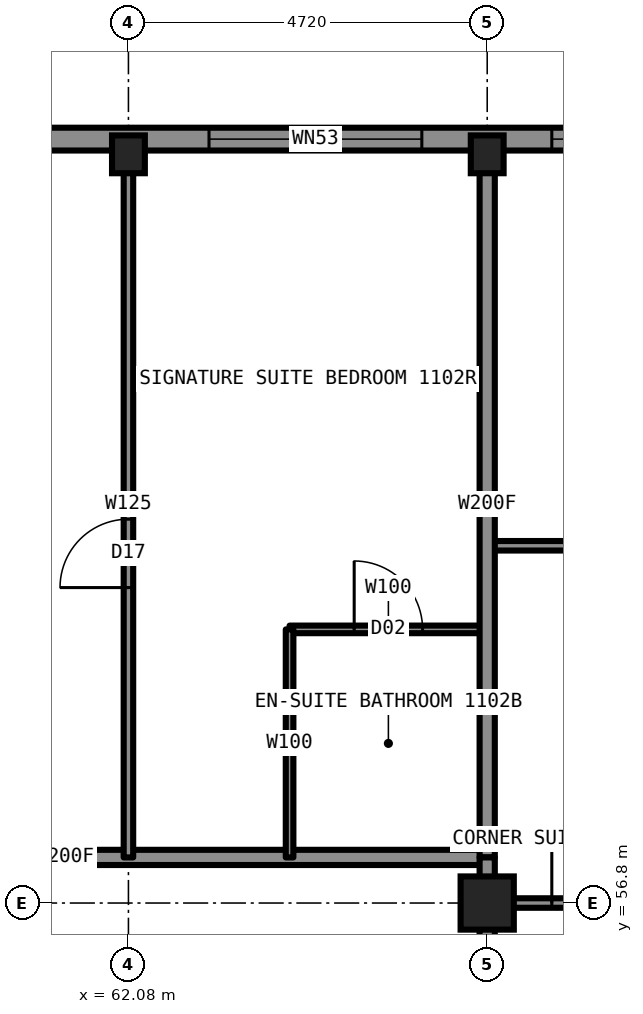
"""IFC4 building model, lengths in metres.
Left out: names, types, materials, properties, quantities, classifications, styles, units other than length and angle.
Written with IfcOpenShell. Run it as: python <this file> out.ifc"""

import sys

from ifc_helpers import new_model, si_unit, direction, frame, frame_2d, origin, origin_2d, place, context, subcontext, project, spatial, rectangle, hollow_rectangle, i_section, extrude, element, fill, save


model = new_model("IFC4")
c1 = context("Model", 3, precision=1e-05, world=origin(), true_north=direction((0.0, 1.0)))
c2 = subcontext(c1, "Body", "Model", "MODEL_VIEW")
j1 = project(units=[si_unit("LENGTHUNIT", "METRE"), si_unit("PLANEANGLEUNIT", "RADIAN")], contexts=[c1])
p1 = place(None, origin())
s1 = spatial("IfcSite", under=j1, at=p1, CompositionType="ELEMENT")
p2 = place(p1, origin())
s2 = spatial("IfcBuilding", under=s1, at=p2, CompositionType="ELEMENT")
p3 = place(p2, frame((0.0, 0.0, 39.0)))
s3 = spatial("IfcBuildingStorey", under=s2, at=p3, CompositionType="ELEMENT", Elevation=39.0)
for number, where, z_axis, x_axis in (
    (1, (62.08, 66.65, 0.0), (0.0, 0.0, 1.0), (1.0, 0.0, 0.0)),
    (2, (66.8, 66.65, 0.0), (0.0, 0.0, 1.0), (1.0, 0.0, 0.0)),
):
    element("IfcColumn", number, at=place(p3, frame(where, z_axis=z_axis, x_axis=x_axis)), inside=s3, PredefinedType="COLUMN", context=c2, shape_type="SweptSolid", body=[
        extrude(i_section(OverallWidth=0.432, OverallDepth=0.498, WebThickness=0.056, FlangeThickness=0.089, at=origin_2d()), origin(), (0.0, 0.0, 1.0), 3.5),
    ])
p4 = place(p3, frame((66.8, 56.8, 0.0), z_axis=(0.0, 0.0, 1.0), x_axis=(1.0, 0.0, 0.0)))
e3 = element("IfcColumn", 3, at=p4, inside=s3, PredefinedType="COLUMN", context=c2, shape_type="SweptSolid", body=[
    extrude(hollow_rectangle(XDim=0.7, YDim=0.7, WallThickness=0.06, at=origin_2d()), origin(), (0.0, 0.0, 1.0), 3.5),
])
p5 = place(p3, frame((66.8, 56.8, 0.0), z_axis=(0.0, 0.0, 1.0), x_axis=(1.0, 0.0, 0.0)))
e4 = element("IfcWall", 4, at=p5, inside=s3, PredefinedType="PARTITIONING", context=c2, shape_type="SweptSolid", body=[
    extrude(rectangle(XDim=9.9, YDim=0.125, at=frame_2d((4.95, 0.0))), origin(), (0.0, 0.0, 1.0), 2.573),
])
p6 = place(p5, frame((0.85, 0.0, 0.0)))
e5 = element("IfcOpeningElement", 5, at=p6, cuts=e4, PredefinedType="OPENING", context=c2, shape_type="SweptSolid", body=[
    extrude(rectangle(XDim=0.9, YDim=2.2, at=frame_2d((0.45, 1.1))), frame((0.0, 0.073, 0.0), z_axis=(0.0, -1.0, 0.0), x_axis=(1.0, 0.0, 0.0)), (0.0, 0.0, 1.0), 0.145),
])
p7 = place(p3, frame((43.2, 57.4, 0.0), z_axis=(0.0, 0.0, 1.0), x_axis=(1.0, 0.0, 0.0)))
e6 = element("IfcWall", 6, at=p7, inside=s3, PredefinedType="PARTITIONING", context=c2, shape_type="SweptSolid", body=[
    extrude(rectangle(XDim=23.6, YDim=0.2, at=frame_2d((11.8, 0.0))), origin(), (0.0, 0.0, 1.0), 3.33),
])
p8 = place(p7, frame((3.0, 0.0, 0.0)))
e7 = element("IfcOpeningElement", 7, at=p8, cuts=e6, PredefinedType="OPENING", context=c2, shape_type="SweptSolid", body=[
    extrude(rectangle(XDim=1.0, YDim=2.2, at=frame_2d((0.5, 1.1))), frame((0.0, 0.11, 0.0), z_axis=(0.0, -1.0, 0.0), x_axis=(1.0, 0.0, 0.0)), (0.0, 0.0, 1.0), 0.22),
])
p9 = place(p7, frame((11.29, 0.0, 0.0)))
e8 = element("IfcOpeningElement", 8, at=p9, cuts=e6, PredefinedType="OPENING", context=c2, shape_type="SweptSolid", body=[
    extrude(rectangle(XDim=1.1, YDim=2.2, at=frame_2d((0.55, 1.1))), frame((0.0, 0.11, 0.0), z_axis=(0.0, -1.0, 0.0), x_axis=(1.0, 0.0, 0.0)), (0.0, 0.0, 1.0), 0.22),
])
p10 = place(p3, frame((64.2, 60.4, 0.0), z_axis=(0.0, 0.0, 1.0), x_axis=(1.0, 0.0, 0.0)))
e9 = element("IfcWall", 9, at=p10, inside=s3, PredefinedType="PARTITIONING", context=c2, shape_type="SweptSolid", body=[
    extrude(rectangle(XDim=2.6, YDim=0.1, at=frame_2d((1.3, 0.0))), origin(), (0.0, 0.0, 1.0), 3.33),
])
p11 = place(p10, frame((0.85, 0.0, 0.0)))
e10 = element("IfcOpeningElement", 10, at=p11, cuts=e9, PredefinedType="OPENING", context=c2, shape_type="SweptSolid", body=[
    extrude(rectangle(XDim=0.9, YDim=2.1, at=frame_2d((0.45, 1.05))), frame((0.0, 0.06, 0.0), z_axis=(0.0, -1.0, 0.0), x_axis=(1.0, 0.0, 0.0)), (0.0, 0.0, 1.0), 0.12),
])
p12 = place(p3, frame((66.8, 61.5, 0.0), z_axis=(0.0, 0.0, 1.0), x_axis=(1.0, 0.0, 0.0)))
e11 = element("IfcWall", 11, at=p12, inside=s3, PredefinedType="PARTITIONING", context=c2, shape_type="SweptSolid", body=[
    extrude(rectangle(XDim=9.894, YDim=0.125, at=frame_2d((4.947, 0.0))), origin(), (0.0, 0.0, 1.0), 3.33),
])
p13 = place(p12, frame((1.75, 0.0, 0.0)))
e12 = element("IfcOpeningElement", 12, at=p13, cuts=e11, PredefinedType="OPENING", context=c2, shape_type="SweptSolid", body=[
    extrude(rectangle(XDim=0.9, YDim=2.2, at=frame_2d((0.45, 1.1))), frame((0.0, 0.073, 0.0), z_axis=(0.0, -1.0, 0.0), x_axis=(1.0, 0.0, 0.0)), (0.0, 0.0, 1.0), 0.145),
])
p14 = place(p3, frame((66.8, 33.2, 0.0), z_axis=(0.0, 0.0, 1.0), x_axis=(0.0, 1.0, 0.0)))
e13 = element("IfcWall", 13, at=p14, inside=s3, PredefinedType="PARTITIONING", context=c2, shape_type="SweptSolid", body=[
    extrude(rectangle(XDim=23.58, YDim=0.2, at=frame_2d((11.79, 0.0))), origin(), (0.0, 0.0, 1.0), 3.33),
])
p15 = place(p14, frame((7.72, 0.0, 0.0)))
e14 = element("IfcOpeningElement", 14, at=p15, cuts=e13, PredefinedType="OPENING", context=c2, shape_type="SweptSolid", body=[
    extrude(rectangle(XDim=1.0, YDim=2.2, at=frame_2d((0.5, 1.1))), frame((0.0, 0.11, 0.0), z_axis=(0.0, -1.0, 0.0), x_axis=(1.0, 0.0, 0.0)), (0.0, 0.0, 1.0), 0.22),
])
p16 = place(p14, frame((17.31, 0.0, 0.0)))
e15 = element("IfcOpeningElement", 15, at=p16, cuts=e13, PredefinedType="OPENING", context=c2, shape_type="SweptSolid", body=[
    extrude(rectangle(XDim=1.0, YDim=2.2, at=frame_2d((0.5, 1.1))), frame((0.0, 0.11, 0.0), z_axis=(0.0, -1.0, 0.0), x_axis=(1.0, 0.0, 0.0)), (0.0, 0.0, 1.0), 0.22),
])
p17 = place(p14, frame((21.84, 0.0, 0.0)))
e16 = element("IfcOpeningElement", 16, at=p17, cuts=e13, PredefinedType="OPENING", context=c2, shape_type="SweptSolid", body=[
    extrude(rectangle(XDim=1.1, YDim=2.2, at=frame_2d((0.55, 1.1))), frame((0.0, 0.11, 0.0), z_axis=(0.0, -1.0, 0.0), x_axis=(1.0, 0.0, 0.0)), (0.0, 0.0, 1.0), 0.22),
])
p18 = place(p14, frame((0.66, 0.0, 0.0)))
e17 = element("IfcOpeningElement", 17, at=p18, cuts=e13, PredefinedType="OPENING", context=c2, shape_type="SweptSolid", body=[
    extrude(rectangle(XDim=1.1, YDim=2.2, at=frame_2d((0.55, 1.1))), frame((0.0, 0.11, 0.0), z_axis=(0.0, -1.0, 0.0), x_axis=(1.0, 0.0, 0.0)), (0.0, 0.0, 1.0), 0.22),
])
p19 = place(p3, frame((66.8, 57.4, 0.0), z_axis=(0.0, 0.0, 1.0), x_axis=(0.0, 1.0, 0.0)))
e18 = element("IfcWall", 18, at=p19, inside=s3, PredefinedType="PARTITIONING", context=c2, shape_type="SweptSolid", body=[
    extrude(rectangle(XDim=9.3, YDim=0.2, at=frame_2d((4.65, 0.0))), origin(), (0.0, 0.0, 1.0), 2.573),
])
p20 = place(p3, frame((62.08, 57.4, 0.0), z_axis=(0.0, 0.0, 1.0), x_axis=(0.0, 1.0, 0.0)))
e19 = element("IfcWall", 19, at=p20, inside=s3, PredefinedType="PARTITIONING", context=c2, shape_type="SweptSolid", body=[
    extrude(rectangle(XDim=9.3, YDim=0.125, at=frame_2d((4.65, 0.0))), origin(), (0.0, 0.0, 1.0), 2.573),
])
p21 = place(p20, frame((3.55, 0.0, 0.0)))
e20 = element("IfcOpeningElement", 20, at=p21, cuts=e19, PredefinedType="OPENING", context=c2, shape_type="SweptSolid", body=[
    extrude(rectangle(XDim=0.9, YDim=2.2, at=frame_2d((0.45, 1.1))), frame((0.0, 0.073, 0.0), z_axis=(0.0, -1.0, 0.0), x_axis=(1.0, 0.0, 0.0)), (0.0, 0.0, 1.0), 0.145),
])
p22 = place(p3, frame((64.2, 57.4, 0.0), z_axis=(0.0, 0.0, 1.0), x_axis=(0.0, 1.0, 0.0)))
e21 = element("IfcWall", 21, at=p22, inside=s3, PredefinedType="PARTITIONING", context=c2, shape_type="SweptSolid", body=[
    extrude(rectangle(XDim=3.0, YDim=0.1, at=frame_2d((1.5, 0.0))), origin(), (0.0, 0.0, 1.0), 3.33),
])
p23 = place(p3, frame((71.5, 66.85, 0.0), z_axis=(0.0, 0.0, 1.0), x_axis=(-1.0, 0.0, 0.0)))
e22 = element("IfcWall", 22, at=p23, inside=s3, PredefinedType="SOLIDWALL", context=c2, shape_type="SweptSolid", body=[
    extrude(rectangle(XDim=33.0, YDim=0.3, at=frame_2d((16.5, 0.0))), origin(), (0.0, 0.0, 1.0), 2.83),
])
p24 = place(p23, frame((0.85, 0.0, 0.5)))
e23 = element("IfcOpeningElement", 23, at=p24, cuts=e22, PredefinedType="OPENING", context=c2, shape_type="SweptSolid", body=[
    extrude(rectangle(XDim=2.5, YDim=2.0, at=frame_2d((1.25, 1.0))), frame((0.0, 0.16, 0.0), z_axis=(0.0, -1.0, 0.0), x_axis=(1.0, 0.0, 0.0)), (0.0, 0.0, 1.0), 0.32),
])
p25 = place(p23, frame((6.61, 0.0, 0.5)))
e24 = element("IfcOpeningElement", 24, at=p25, cuts=e22, PredefinedType="OPENING", context=c2, shape_type="SweptSolid", body=[
    extrude(rectangle(XDim=1.9, YDim=1.9, at=frame_2d((0.95, 0.95))), frame((0.0, 0.16, 0.0), z_axis=(0.0, -1.0, 0.0), x_axis=(1.0, 0.0, 0.0)), (0.0, 0.0, 1.0), 0.32),
])
p26 = place(p23, frame((10.28, 0.0, 0.5)))
e25 = element("IfcOpeningElement", 25, at=p26, cuts=e22, PredefinedType="OPENING", context=c2, shape_type="SweptSolid", body=[
    extrude(rectangle(XDim=3.0, YDim=2.0, at=frame_2d((1.5, 1.0))), frame((0.0, 0.16, 0.0), z_axis=(0.0, -1.0, 0.0), x_axis=(1.0, 0.0, 0.0)), (0.0, 0.0, 1.0), 0.32),
])
p27 = place(p23, frame((15.0, 0.0, 0.5)))
e26 = element("IfcOpeningElement", 26, at=p27, cuts=e22, PredefinedType="OPENING", context=c2, shape_type="SweptSolid", body=[
    extrude(rectangle(XDim=3.0, YDim=2.0, at=frame_2d((1.5, 1.0))), frame((0.0, 0.16, 0.0), z_axis=(0.0, -1.0, 0.0), x_axis=(1.0, 0.0, 0.0)), (0.0, 0.0, 1.0), 0.32),
])
p28 = place(p23, frame((19.72, 0.0, 0.5)))
e27 = element("IfcOpeningElement", 27, at=p28, cuts=e22, PredefinedType="OPENING", context=c2, shape_type="SweptSolid", body=[
    extrude(rectangle(XDim=3.0, YDim=2.0, at=frame_2d((1.5, 1.0))), frame((0.0, 0.16, 0.0), z_axis=(0.0, -1.0, 0.0), x_axis=(1.0, 0.0, 0.0)), (0.0, 0.0, 1.0), 0.32),
])
p29 = place(p23, frame((24.44, 0.0, 0.5)))
e28 = element("IfcOpeningElement", 28, at=p29, cuts=e22, PredefinedType="OPENING", context=c2, shape_type="SweptSolid", body=[
    extrude(rectangle(XDim=1.9, YDim=1.9, at=frame_2d((0.95, 0.95))), frame((0.0, 0.16, 0.0), z_axis=(0.0, -1.0, 0.0), x_axis=(1.0, 0.0, 0.0)), (0.0, 0.0, 1.0), 0.32),
])
p30 = place(p23, frame((29.6, 0.0, 0.5)))
e29 = element("IfcOpeningElement", 29, at=p30, cuts=e22, PredefinedType="OPENING", context=c2, shape_type="SweptSolid", body=[
    extrude(rectangle(XDim=2.5, YDim=2.0, at=frame_2d((1.25, 1.0))), frame((0.0, 0.16, 0.0), z_axis=(0.0, -1.0, 0.0), x_axis=(1.0, 0.0, 0.0)), (0.0, 0.0, 1.0), 0.32),
])
p31 = place(p23, frame((5.91, 0.0, 0.5)))
e30 = element("IfcOpeningElement", 30, at=p31, cuts=e22, PredefinedType="OPENING", context=c2, shape_type="SweptSolid", body=[
    extrude(rectangle(XDim=0.7, YDim=1.0, at=frame_2d((0.35, 0.5))), frame((0.0, 0.16, 0.0), z_axis=(0.0, -1.0, 0.0), x_axis=(1.0, 0.0, 0.0)), (0.0, 0.0, 1.0), 0.32),
])
p32 = place(p23, frame((26.39, 0.0, 0.5)))
e31 = element("IfcOpeningElement", 31, at=p32, cuts=e22, PredefinedType="OPENING", context=c2, shape_type="SweptSolid", body=[
    extrude(rectangle(XDim=0.7, YDim=1.0, at=frame_2d((0.35, 0.5))), frame((0.0, 0.16, 0.0), z_axis=(0.0, -1.0, 0.0), x_axis=(1.0, 0.0, 0.0)), (0.0, 0.0, 1.0), 0.32),
])
p33 = place(p3, frame((66.8, 56.78, 0.0), z_axis=(0.0, 0.0, 1.0), x_axis=(0.0, 1.0, 0.0)))
e32 = element("IfcWall", 32, at=p33, inside=s3, PredefinedType="PARTITIONING", context=c2, shape_type="SweptSolid", body=[
    extrude(rectangle(XDim=0.62, YDim=0.2, at=frame_2d((0.31, 0.0))), origin(), (0.0, 0.0, 1.0), 2.573),
])
p34 = place(p11, origin())
e33 = element("IfcDoor", 33, at=p34, inside=s3, OperationType="SINGLE_SWING_RIGHT", PredefinedType="DOOR", context=c2, shape_type="SweptSolid", body=[
    extrude(rectangle(XDim=0.9, YDim=2.1, at=frame_2d((0.45, 1.05))), frame((0.0, 0.025, 0.0), z_axis=(0.0, -1.0, 0.0), x_axis=(1.0, 0.0, 0.0)), (0.0, 0.0, 1.0), 0.05),
])
fill(e10, e33)
p35 = place(p21, origin())
e34 = element("IfcDoor", 34, at=p35, inside=s3, OperationType="SINGLE_SWING_LEFT", PredefinedType="DOOR", context=c2, shape_type="SweptSolid", body=[
    extrude(rectangle(XDim=0.9, YDim=2.2, at=frame_2d((0.45, 1.1))), frame((0.0, 0.025, 0.0), z_axis=(0.0, -1.0, 0.0), x_axis=(1.0, 0.0, 0.0)), (0.0, 0.0, 1.0), 0.05),
])
fill(e20, e34)
p36 = place(p6, origin())
e35 = element("IfcDoor", 35, at=p36, inside=s3, OperationType="SINGLE_SWING_LEFT", PredefinedType="DOOR", context=c2, shape_type="SweptSolid", body=[
    extrude(rectangle(XDim=0.9, YDim=2.2, at=frame_2d((0.45, 1.1))), frame((0.0, 0.025, 0.0), z_axis=(0.0, -1.0, 0.0), x_axis=(1.0, 0.0, 0.0)), (0.0, 0.0, 1.0), 0.05),
])
fill(e5, e35)
p37 = place(p25, origin())
e36 = element("IfcWindow", 36, at=p37, inside=s3, PartitioningType="SINGLE_PANEL", PredefinedType="WINDOW", context=c2, shape_type="SweptSolid", body=[
    extrude(rectangle(XDim=1.9, YDim=1.9, at=frame_2d((0.95, 0.95))), frame((0.0, 0.03, 0.0), z_axis=(0.0, -1.0, 0.0), x_axis=(1.0, 0.0, 0.0)), (0.0, 0.0, 1.0), 0.06),
])
fill(e24, e36)
p38 = place(p26, origin())
e37 = element("IfcWindow", 37, at=p38, inside=s3, PartitioningType="SINGLE_PANEL", PredefinedType="WINDOW", context=c2, shape_type="SweptSolid", body=[
    extrude(rectangle(XDim=3.0, YDim=2.0, at=frame_2d((1.5, 1.0))), frame((0.0, 0.03, 0.0), z_axis=(0.0, -1.0, 0.0), x_axis=(1.0, 0.0, 0.0)), (0.0, 0.0, 1.0), 0.06),
])
fill(e25, e37)
p39 = place(p31, origin())
e38 = element("IfcWindow", 38, at=p39, inside=s3, PartitioningType="SINGLE_PANEL", PredefinedType="WINDOW", context=c2, shape_type="SweptSolid", body=[
    extrude(rectangle(XDim=0.7, YDim=1.0, at=frame_2d((0.35, 0.5))), frame((0.0, 0.03, 0.0), z_axis=(0.0, -1.0, 0.0), x_axis=(1.0, 0.0, 0.0)), (0.0, 0.0, 1.0), 0.06),
])
fill(e30, e38)
save(model, sys.argv[1])
